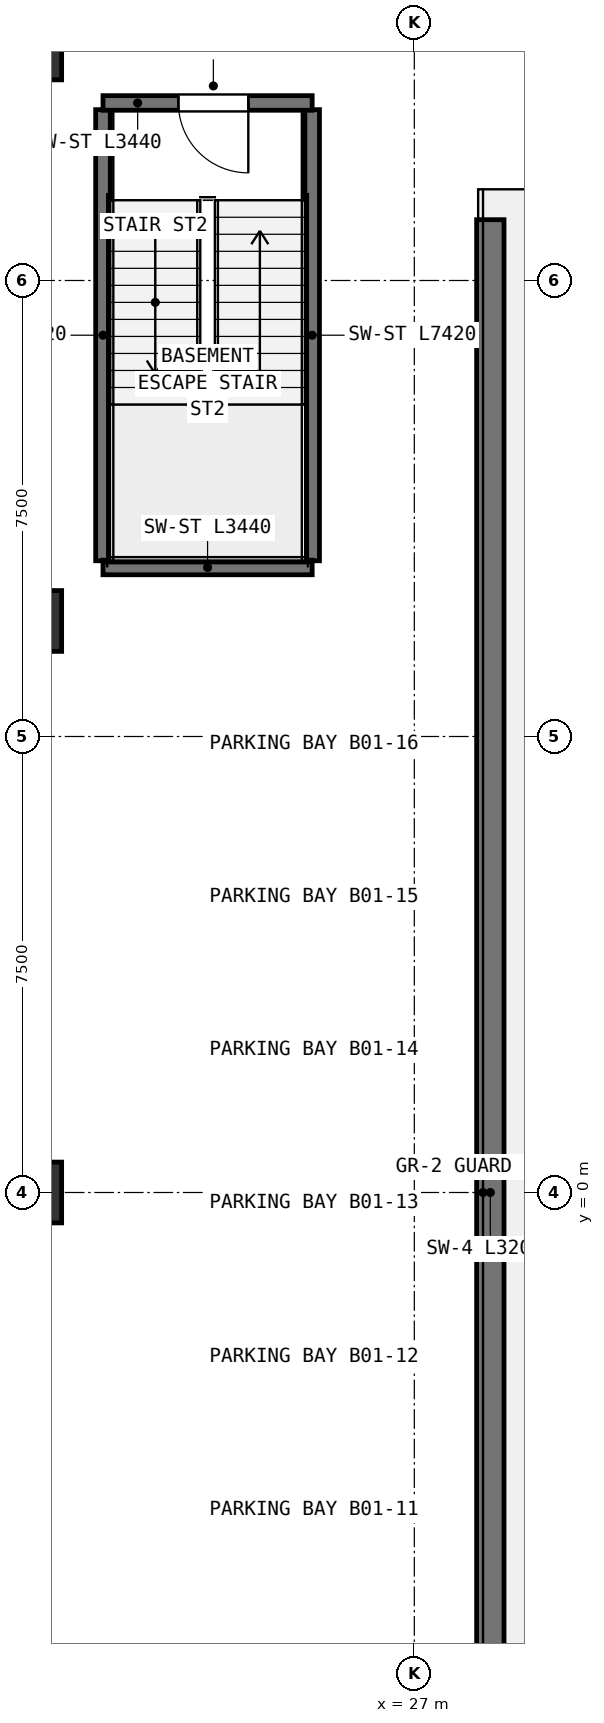
"""IFC4 building model, lengths in metres.
Left out: names, types, materials, properties, quantities, classifications, styles, units other than length and angle.
Written with IfcOpenShell. Run it as: python <this file> out.ifc"""

import sys

from ifc_helpers import new_model, si_unit, direction, frame, frame_2d, origin, origin_2d, place, context, subcontext, project, spatial, rectangle, extrude, element, fill, save


model = new_model("IFC4")
c1 = context("Model", 3, precision=1e-05, world=origin(), true_north=direction((0.0, 1.0)))
c2 = subcontext(c1, "Body", "Model", "MODEL_VIEW")
j1 = project(units=[si_unit("LENGTHUNIT", "METRE"), si_unit("PLANEANGLEUNIT", "RADIAN")], contexts=[c1])
p1 = place(None, origin())
s1 = spatial("IfcSite", under=j1, at=p1, CompositionType="ELEMENT")
p2 = place(p1, origin())
s2 = spatial("IfcBuilding", under=s1, at=p2, CompositionType="ELEMENT")
p3 = place(p2, frame((0.0, 0.0, -4.5)))
s3 = spatial("IfcBuildingStorey", under=s2, at=p3, CompositionType="ELEMENT", Elevation=-4.5)
p4 = place(p3, frame((28.25, -16.0, 0.0), z_axis=(0.0, 0.0, 1.0), x_axis=(0.0, 1.0, 0.0)))
e1 = element("IfcWall", 1, at=p4, inside=s3, PredefinedType="SHEAR", context=c2, shape_type="SweptSolid", body=[
    extrude(rectangle(XDim=32.0, YDim=0.45, at=frame_2d((16.0, 0.0))), origin(), (0.0, 0.0, 1.0), 1.97),
])
p5 = place(p3, frame((20.35, -8.429, 0.0), z_axis=(0.0, 0.0, 1.0), x_axis=(-0.923879532511, 0.382683432365, 0.0)))
e2 = element("IfcColumn", 2, at=p5, inside=s3, PredefinedType="COLUMN", context=c2, shape_type="SweptSolid", body=[
    extrude(rectangle(XDim=1.8, YDim=2.2, at=origin_2d()), origin(), (0.0, 0.0, 1.0), 4.5),
])
for number, where, z_axis, x_axis in (
    (3, (20.8, 0.0, 0.0), (0.0, 0.0, 1.0), (1.0, 0.0, 0.0)),
    (4, (20.8, 9.4, 0.0), (0.0, 0.0, 1.0), (1.0, 0.0, 0.0)),
    (5, (20.8, 18.8, 0.0), (0.0, 0.0, 1.0), (1.0, 0.0, 0.0)),
):
    element("IfcColumn", number, at=place(p3, frame(where, z_axis=z_axis, x_axis=x_axis)), inside=s3, PredefinedType="COLUMN", context=c2, shape_type="SweptSolid", body=[
        extrude(rectangle(XDim=0.8, YDim=1.0, at=origin_2d()), origin(), (0.0, 0.0, 1.0), 4.5),
    ])
for number, where, z_axis, x_axis in (
    (6, (21.88, 10.39, 0.0), (0.0, 0.0, 1.0), (0.0, 1.0, 0.0)),
    (7, (25.32, 10.39, 0.0), (0.0, 0.0, 1.0), (0.0, 1.0, 0.0)),
):
    element("IfcWall", number, at=place(p3, frame(where, z_axis=z_axis, x_axis=x_axis)), inside=s3, PredefinedType="SHEAR", context=c2, shape_type="SweptSolid", body=[
        extrude(rectangle(XDim=7.42, YDim=0.24, at=frame_2d((3.71, 0.0))), origin(), (0.0, 0.0, 1.0), 4.22),
    ])
p6 = place(p3, frame((21.88, 10.28, 0.0), z_axis=(0.0, 0.0, 1.0), x_axis=(1.0, 0.0, 0.0)))
e8 = element("IfcWall", 8, at=p6, inside=s3, PredefinedType="SHEAR", context=c2, shape_type="SweptSolid", body=[
    extrude(rectangle(XDim=3.44, YDim=0.24, at=frame_2d((1.72, 0.0))), origin(), (0.0, 0.0, 1.0), 4.22),
])
p7 = place(p3, frame((25.32, 17.92, 0.0), z_axis=(0.0, 0.0, 1.0), x_axis=(-1.0, 0.0, 0.0)))
e9 = element("IfcWall", 9, at=p7, inside=s3, PredefinedType="SHEAR", context=c2, shape_type="SweptSolid", body=[
    extrude(rectangle(XDim=3.44, YDim=0.24, at=frame_2d((1.72, 0.0))), origin(), (0.0, 0.0, 1.0), 4.22),
])
p8 = place(p7, frame((1.05, 0.0, 0.0)))
e10 = element("IfcOpeningElement", 10, at=p8, cuts=e9, PredefinedType="OPENING", context=c2, shape_type="SweptSolid", body=[
    extrude(rectangle(XDim=1.15, YDim=2.15, at=frame_2d((0.575, 1.075))), frame((0.0, 0.13, 0.0), z_axis=(0.0, -1.0, 0.0), x_axis=(1.0, 0.0, 0.0)), (0.0, 0.0, 1.0), 0.26),
])
p9 = place(p8, origin())
e11 = element("IfcDoor", 11, at=p9, inside=s3, OperationType="SINGLE_SWING_LEFT", PredefinedType="DOOR", context=c2, shape_type="SweptSolid", body=[
    extrude(rectangle(XDim=1.15, YDim=2.15, at=frame_2d((0.575, 1.075))), frame((0.0, 0.025, 0.0), z_axis=(0.0, -1.0, 0.0), x_axis=(1.0, 0.0, 0.0)), (0.0, 0.0, 1.0), 0.05),
])
fill(e10, e11)
save(model, sys.argv[1])
